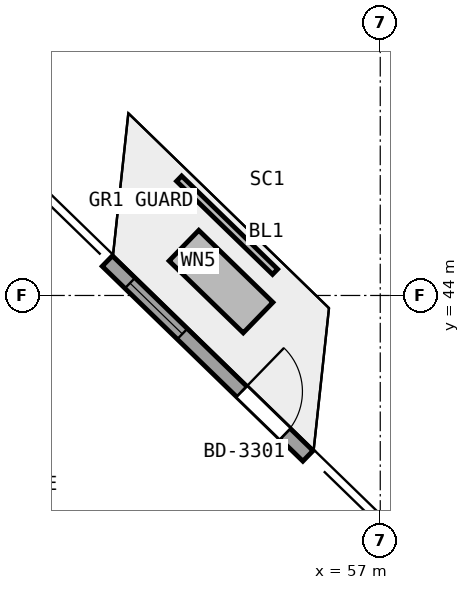
"""IFC4 building model, lengths in metres.
Left out: names, types, materials, properties, quantities, classifications, styles, units other than length and angle.
Written with IfcOpenShell. Run it as: python <this file> out.ifc"""

import sys

from ifc_helpers import new_model, si_unit, direction, frame, frame_2d, origin, place, context, subcontext, project, spatial, rectangle, extrude, element, fill, save


model = new_model("IFC4")
c1 = context("Model", 3, precision=1e-05, world=origin(), true_north=direction((0.0, 1.0)))
c2 = subcontext(c1, "Body", "Model", "MODEL_VIEW")
j1 = project(units=[si_unit("LENGTHUNIT", "METRE"), si_unit("PLANEANGLEUNIT", "RADIAN")], contexts=[c1])
p1 = place(None, origin())
s1 = spatial("IfcSite", under=j1, at=p1, CompositionType="ELEMENT")
p2 = place(p1, origin())
s2 = spatial("IfcBuilding", under=s1, at=p2, CompositionType="ELEMENT")
p3 = place(p2, frame((0.0, 0.0, 125.7)))
s3 = spatial("IfcBuildingStorey", under=s2, at=p3, CompositionType="ELEMENT", Elevation=125.7)
p4 = place(p3, frame((52.511, 44.566, 0.0), z_axis=(0.0, 0.0, 1.0), x_axis=(0.717380168639, -0.696681917121, 0.0)))
e1 = element("IfcWall", 1, at=p4, inside=s3, PredefinedType="SOLIDWALL", context=c2, shape_type="SweptSolid", body=[
    extrude(rectangle(XDim=4.6, YDim=0.24, at=frame_2d((2.3, 0.0))), origin(), (0.0, 0.0, 1.0), 3.32),
])
p5 = place(p4, frame((3.08, 0.0, 0.0)))
e2 = element("IfcOpeningElement", 2, at=p5, cuts=e1, PredefinedType="OPENING", context=c2, shape_type="SweptSolid", body=[
    extrude(rectangle(XDim=1.0, YDim=2.15, at=frame_2d((0.5, 1.075))), frame((0.0, 0.13, 0.0), z_axis=(0.0, -1.0, 0.0), x_axis=(1.0, 0.0, 0.0)), (0.0, 0.0, 1.0), 0.26),
])
p6 = place(p4, frame((0.52, 0.0, 0.2)))
e3 = element("IfcOpeningElement", 3, at=p6, cuts=e1, PredefinedType="OPENING", context=c2, shape_type="SweptSolid", body=[
    extrude(rectangle(XDim=1.2, YDim=1.8, at=frame_2d((0.6, 0.9))), frame((0.0, 0.13, 0.0), z_axis=(0.0, -1.0, 0.0), x_axis=(1.0, 0.0, 0.0)), (0.0, 0.0, 1.0), 0.26),
])
p7 = place(p5, origin())
e4 = element("IfcDoor", 4, at=p7, inside=s3, OperationType="SINGLE_SWING_LEFT", PredefinedType="DOOR", context=c2, shape_type="SweptSolid", body=[
    extrude(rectangle(XDim=1.0, YDim=2.15, at=frame_2d((0.5, 1.075))), frame((0.0, 0.025, 0.0), z_axis=(0.0, -1.0, 0.0), x_axis=(1.0, 0.0, 0.0)), (0.0, 0.0, 1.0), 0.05),
])
fill(e2, e4)
p8 = place(p6, origin())
e5 = element("IfcWindow", 5, at=p8, inside=s3, PartitioningType="SINGLE_PANEL", PredefinedType="WINDOW", context=c2, shape_type="SweptSolid", body=[
    extrude(rectangle(XDim=1.2, YDim=1.8, at=frame_2d((0.6, 0.9))), frame((0.0, 0.03, 0.0), z_axis=(0.0, -1.0, 0.0), x_axis=(1.0, 0.0, 0.0)), (0.0, 0.0, 1.0), 0.06),
])
fill(e3, e5)
save(model, sys.argv[1])
